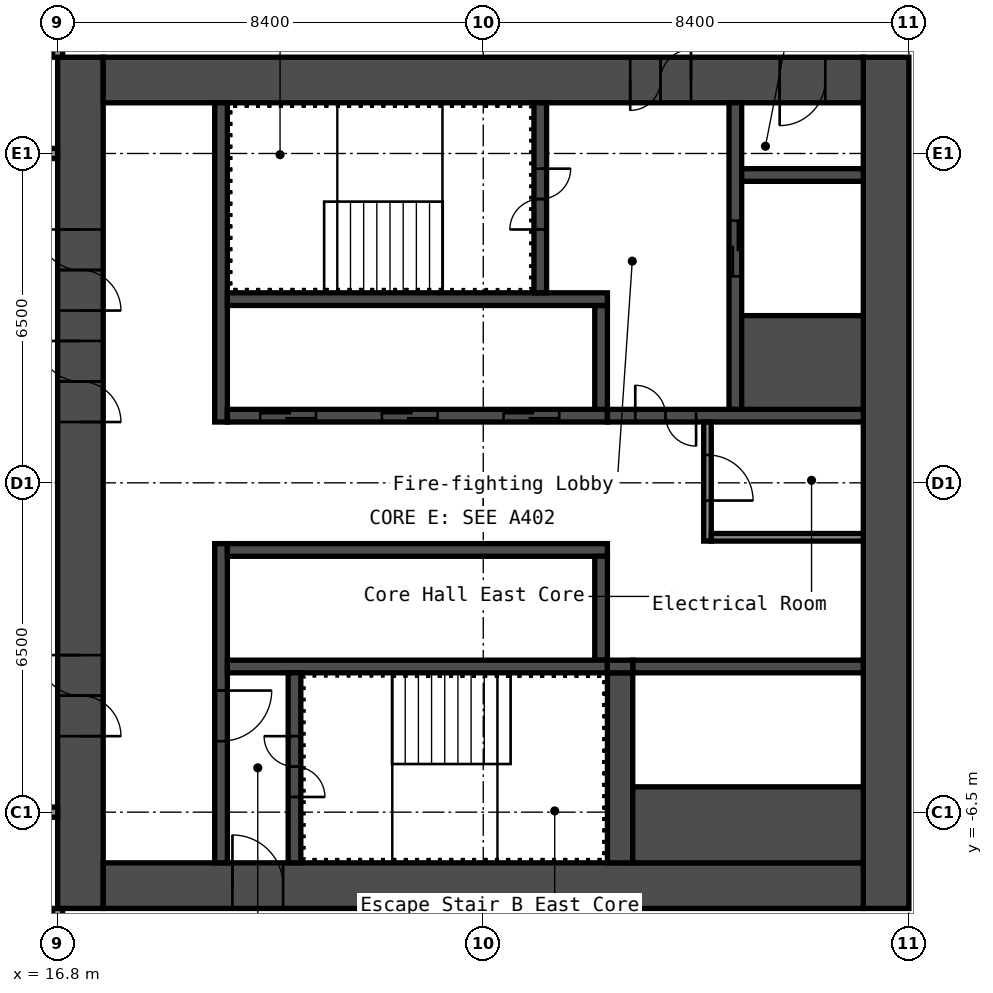
"""IFC4 building model, lengths in metres.
Left out: names, types, materials, properties, quantities, classifications, styles, units other than length and angle.
Written with IfcOpenShell. Run it as: python <this file> out.ifc"""

import sys

from ifc_helpers import new_model, si_unit, direction, frame, frame_2d, origin, place, context, subcontext, project, spatial, rectangle, extrude, element, fill, save


model = new_model("IFC4")
c1 = context("Model", 3, precision=1e-05, world=origin(), true_north=direction((0.0, 1.0)))
c2 = subcontext(c1, "Body", "Model", "MODEL_VIEW")
j1 = project(units=[si_unit("LENGTHUNIT", "METRE"), si_unit("PLANEANGLEUNIT", "RADIAN")], contexts=[c1])
p1 = place(None, origin())
s1 = spatial("IfcSite", under=j1, at=p1, CompositionType="ELEMENT")
p2 = place(p1, origin())
s2 = spatial("IfcBuilding", under=s1, at=p2, CompositionType="ELEMENT")
p3 = place(p2, frame((0.0, 0.0, 9.0)))
s3 = spatial("IfcBuildingStorey", under=s2, at=p3, CompositionType="ELEMENT", Elevation=9.0)
p4 = place(p3, frame((17.25, -8.4, 0.0), z_axis=(0.0, 0.0, 1.0), x_axis=(0.0, 1.0, 0.0)))
e1 = element("IfcWall", 1, at=p4, inside=s3, PredefinedType="SHEAR", context=c2, shape_type="SweptSolid", body=[
    extrude(rectangle(XDim=16.8, YDim=0.9, at=frame_2d((8.4, 0.0))), origin(), (0.0, 0.0, 1.0), 5.6),
])
p5 = place(p4, frame((3.4, 0.0, 0.0)))
e2 = element("IfcOpeningElement", 2, at=p5, cuts=e1, PredefinedType="OPENING", context=c2, shape_type="SweptSolid", body=[
    extrude(rectangle(XDim=1.6, YDim=2.1, at=frame_2d((0.8, 1.05))), frame((0.0, 0.46, 0.0), z_axis=(0.0, -1.0, 0.0), x_axis=(1.0, 0.0, 0.0)), (0.0, 0.0, 1.0), 0.92),
])
p6 = place(p4, frame((9.6, 0.0, 0.0)))
e3 = element("IfcOpeningElement", 3, at=p6, cuts=e1, PredefinedType="OPENING", context=c2, shape_type="SweptSolid", body=[
    extrude(rectangle(XDim=1.6, YDim=2.1, at=frame_2d((0.8, 1.05))), frame((0.0, 0.46, 0.0), z_axis=(0.0, -1.0, 0.0), x_axis=(1.0, 0.0, 0.0)), (0.0, 0.0, 1.0), 0.92),
])
p7 = place(p4, frame((11.8, 0.0, 0.0)))
e4 = element("IfcOpeningElement", 4, at=p7, cuts=e1, PredefinedType="OPENING", context=c2, shape_type="SweptSolid", body=[
    extrude(rectangle(XDim=1.6, YDim=2.1, at=frame_2d((0.8, 1.05))), frame((0.0, 0.46, 0.0), z_axis=(0.0, -1.0, 0.0), x_axis=(1.0, 0.0, 0.0)), (0.0, 0.0, 1.0), 0.92),
])
p8 = place(p3, frame((33.15, -8.4, 0.0), z_axis=(0.0, 0.0, 1.0), x_axis=(0.0, 1.0, 0.0)))
e5 = element("IfcWall", 5, at=p8, inside=s3, PredefinedType="SHEAR", context=c2, shape_type="SweptSolid", body=[
    extrude(rectangle(XDim=16.8, YDim=0.9, at=frame_2d((8.4, 0.0))), origin(), (0.0, 0.0, 1.0), 5.6),
])
p9 = place(p3, frame((17.7, 7.95, 0.0), z_axis=(0.0, 0.0, 1.0), x_axis=(1.0, 0.0, 0.0)))
e6 = element("IfcWall", 6, at=p9, inside=s3, PredefinedType="SHEAR", context=c2, shape_type="SweptSolid", body=[
    extrude(rectangle(XDim=15.0, YDim=0.9, at=frame_2d((7.5, 0.0))), origin(), (0.0, 0.0, 1.0), 5.6),
])
p10 = place(p9, frame((10.4, 0.0, 0.0)))
e7 = element("IfcOpeningElement", 7, at=p10, cuts=e6, PredefinedType="OPENING", context=c2, shape_type="SweptSolid", body=[
    extrude(rectangle(XDim=1.2, YDim=2.1, at=frame_2d((0.6, 1.05))), frame((0.0, 0.46, 0.0), z_axis=(0.0, -1.0, 0.0), x_axis=(1.0, 0.0, 0.0)), (0.0, 0.0, 1.0), 0.92),
])
p11 = place(p9, frame((13.35, 0.0, 0.0)))
e8 = element("IfcOpeningElement", 8, at=p11, cuts=e6, PredefinedType="OPENING", context=c2, shape_type="SweptSolid", body=[
    extrude(rectangle(XDim=0.9, YDim=2.1, at=frame_2d((0.45, 1.05))), frame((0.0, 0.46, 0.0), z_axis=(0.0, -1.0, 0.0), x_axis=(1.0, 0.0, 0.0)), (0.0, 0.0, 1.0), 0.92),
])
p12 = place(p3, frame((17.7, -7.95, 0.0), z_axis=(0.0, 0.0, 1.0), x_axis=(1.0, 0.0, 0.0)))
e9 = element("IfcWall", 9, at=p12, inside=s3, PredefinedType="SHEAR", context=c2, shape_type="SweptSolid", body=[
    extrude(rectangle(XDim=15.0, YDim=0.9, at=frame_2d((7.5, 0.0))), origin(), (0.0, 0.0, 1.0), 5.6),
])
p13 = place(p12, frame((2.55, 0.0, 0.0)))
e10 = element("IfcOpeningElement", 10, at=p13, cuts=e9, PredefinedType="OPENING", context=c2, shape_type="SweptSolid", body=[
    extrude(rectangle(XDim=1.0, YDim=2.1, at=frame_2d((0.5, 1.05))), frame((0.0, 0.46, 0.0), z_axis=(0.0, -1.0, 0.0), x_axis=(1.0, 0.0, 0.0)), (0.0, 0.0, 1.0), 0.92),
])
p14 = place(p3, frame((20.025, 1.2, 0.0), z_axis=(0.0, 0.0, 1.0), x_axis=(0.0, 1.0, 0.0)))
e11 = element("IfcWall", 11, at=p14, inside=s3, PredefinedType="SHEAR", context=c2, shape_type="SweptSolid", body=[
    extrude(rectangle(XDim=6.3, YDim=0.25, at=frame_2d((3.15, 0.0))), origin(), (0.0, 0.0, 1.0), 5.6),
])
p15 = place(p3, frame((20.025, -7.5, 0.0), z_axis=(0.0, 0.0, 1.0), x_axis=(0.0, 1.0, 0.0)))
e12 = element("IfcWall", 12, at=p15, inside=s3, PredefinedType="SHEAR", context=c2, shape_type="SweptSolid", body=[
    extrude(rectangle(XDim=6.3, YDim=0.25, at=frame_2d((3.15, 0.0))), origin(), (0.0, 0.0, 1.0), 5.6),
])
p16 = place(p15, frame((2.4, 0.0, 0.0)))
e13 = element("IfcOpeningElement", 13, at=p16, cuts=e12, PredefinedType="OPENING", context=c2, shape_type="SweptSolid", body=[
    extrude(rectangle(XDim=1.0, YDim=2.1, at=frame_2d((0.5, 1.05))), frame((0.0, 0.135, 0.0), z_axis=(0.0, -1.0, 0.0), x_axis=(1.0, 0.0, 0.0)), (0.0, 0.0, 1.0), 0.27),
])
p17 = place(p3, frame((20.15, 1.325, 0.0), z_axis=(0.0, 0.0, 1.0), x_axis=(1.0, 0.0, 0.0)))
e14 = element("IfcWall", 14, at=p17, inside=s3, PredefinedType="SHEAR", context=c2, shape_type="SweptSolid", body=[
    extrude(rectangle(XDim=7.5, YDim=0.25, at=frame_2d((3.75, 0.0))), origin(), (0.0, 0.0, 1.0), 5.6),
])
p18 = place(p17, frame((0.65, 0.0, 0.0)))
e15 = element("IfcOpeningElement", 15, at=p18, cuts=e14, PredefinedType="OPENING", context=c2, shape_type="SweptSolid", body=[
    extrude(rectangle(XDim=1.1, YDim=2.1, at=frame_2d((0.55, 1.05))), frame((0.0, 0.135, 0.0), z_axis=(0.0, -1.0, 0.0), x_axis=(1.0, 0.0, 0.0)), (0.0, 0.0, 1.0), 0.27),
])
p19 = place(p17, frame((3.05, 0.0, 0.0)))
e16 = element("IfcOpeningElement", 16, at=p19, cuts=e14, PredefinedType="OPENING", context=c2, shape_type="SweptSolid", body=[
    extrude(rectangle(XDim=1.1, YDim=2.1, at=frame_2d((0.55, 1.05))), frame((0.0, 0.135, 0.0), z_axis=(0.0, -1.0, 0.0), x_axis=(1.0, 0.0, 0.0)), (0.0, 0.0, 1.0), 0.27),
])
p20 = place(p17, frame((5.45, 0.0, 0.0)))
e17 = element("IfcOpeningElement", 17, at=p20, cuts=e14, PredefinedType="OPENING", context=c2, shape_type="SweptSolid", body=[
    extrude(rectangle(XDim=1.1, YDim=2.1, at=frame_2d((0.55, 1.05))), frame((0.0, 0.135, 0.0), z_axis=(0.0, -1.0, 0.0), x_axis=(1.0, 0.0, 0.0)), (0.0, 0.0, 1.0), 0.27),
])
p21 = place(p3, frame((27.525, 1.45, 0.0), z_axis=(0.0, 0.0, 1.0), x_axis=(0.0, 1.0, 0.0)))
e18 = element("IfcWall", 18, at=p21, inside=s3, PredefinedType="SHEAR", context=c2, shape_type="SweptSolid", body=[
    extrude(rectangle(XDim=2.05, YDim=0.25, at=frame_2d((1.025, 0.0))), origin(), (0.0, 0.0, 1.0), 5.6),
])
p22 = place(p3, frame((20.15, 3.625, 0.0), z_axis=(0.0, 0.0, 1.0), x_axis=(1.0, 0.0, 0.0)))
e19 = element("IfcWall", 19, at=p22, inside=s3, PredefinedType="SHEAR", context=c2, shape_type="SweptSolid", body=[
    extrude(rectangle(XDim=7.5, YDim=0.25, at=frame_2d((3.75, 0.0))), origin(), (0.0, 0.0, 1.0), 5.6),
])
p23 = place(p3, frame((26.325, 3.75, 0.0), z_axis=(0.0, 0.0, 1.0), x_axis=(0.0, 1.0, 0.0)))
e20 = element("IfcWall", 20, at=p23, inside=s3, PredefinedType="SHEAR", context=c2, shape_type="SweptSolid", body=[
    extrude(rectangle(XDim=3.75, YDim=0.25, at=frame_2d((1.875, 0.0))), origin(), (0.0, 0.0, 1.0), 5.6),
])
p24 = place(p23, frame((1.25, 0.0, 0.0)))
e21 = element("IfcOpeningElement", 21, at=p24, cuts=e20, PredefinedType="OPENING", context=c2, shape_type="SweptSolid", body=[
    extrude(rectangle(XDim=1.2, YDim=2.1, at=frame_2d((0.6, 1.05))), frame((0.0, 0.135, 0.0), z_axis=(0.0, -1.0, 0.0), x_axis=(1.0, 0.0, 0.0)), (0.0, 0.0, 1.0), 0.27),
])
p25 = place(p3, frame((27.65, 1.325, 0.0), z_axis=(0.0, 0.0, 1.0), x_axis=(1.0, 0.0, 0.0)))
e22 = element("IfcWall", 22, at=p25, inside=s3, PredefinedType="SHEAR", context=c2, shape_type="SweptSolid", body=[
    extrude(rectangle(XDim=5.05, YDim=0.25, at=frame_2d((2.525, 0.0))), origin(), (0.0, 0.0, 1.0), 5.6),
])
p26 = place(p25, frame((0.55, 0.0, 0.0)))
e23 = element("IfcOpeningElement", 23, at=p26, cuts=e22, PredefinedType="OPENING", context=c2, shape_type="SweptSolid", body=[
    extrude(rectangle(XDim=1.2, YDim=2.1, at=frame_2d((0.6, 1.05))), frame((0.0, 0.135, 0.0), z_axis=(0.0, -1.0, 0.0), x_axis=(1.0, 0.0, 0.0)), (0.0, 0.0, 1.0), 0.27),
])
p27 = place(p3, frame((30.175, 1.45, 0.0), z_axis=(0.0, 0.0, 1.0), x_axis=(0.0, 1.0, 0.0)))
e24 = element("IfcWall", 24, at=p27, inside=s3, PredefinedType="SHEAR", context=c2, shape_type="SweptSolid", body=[
    extrude(rectangle(XDim=6.05, YDim=0.25, at=frame_2d((3.025, 0.0))), origin(), (0.0, 0.0, 1.0), 5.6),
])
p28 = place(p27, frame((2.625, 0.0, 0.0)))
e25 = element("IfcOpeningElement", 25, at=p28, cuts=e24, PredefinedType="OPENING", context=c2, shape_type="SweptSolid", body=[
    extrude(rectangle(XDim=1.1, YDim=2.1, at=frame_2d((0.55, 1.05))), frame((0.0, 0.135, 0.0), z_axis=(0.0, -1.0, 0.0), x_axis=(1.0, 0.0, 0.0)), (0.0, 0.0, 1.0), 0.27),
])
p29 = place(p3, frame((30.3, 2.375, 0.0), z_axis=(0.0, 0.0, 1.0), x_axis=(1.0, 0.0, 0.0)))
e26 = element("IfcWall", 26, at=p29, inside=s3, PredefinedType="SHEAR", context=c2, shape_type="SweptSolid", body=[
    extrude(rectangle(XDim=2.4, YDim=1.85, at=frame_2d((1.2, 0.0))), origin(), (0.0, 0.0, 1.0), 5.6),
])
p30 = place(p3, frame((30.3, 6.075, 0.0), z_axis=(0.0, 0.0, 1.0), x_axis=(1.0, 0.0, 0.0)))
e27 = element("IfcWall", 27, at=p30, inside=s3, PredefinedType="SHEAR", context=c2, shape_type="SweptSolid", body=[
    extrude(rectangle(XDim=2.4, YDim=0.25, at=frame_2d((1.2, 0.0))), origin(), (0.0, 0.0, 1.0), 5.6),
])
p31 = place(p3, frame((20.15, -1.325, 0.0), z_axis=(0.0, 0.0, 1.0), x_axis=(1.0, 0.0, 0.0)))
e28 = element("IfcWall", 28, at=p31, inside=s3, PredefinedType="SHEAR", context=c2, shape_type="SweptSolid", body=[
    extrude(rectangle(XDim=7.5, YDim=0.25, at=frame_2d((3.75, 0.0))), origin(), (0.0, 0.0, 1.0), 5.6),
])
p32 = place(p3, frame((27.525, -3.5, 0.0), z_axis=(0.0, 0.0, 1.0), x_axis=(0.0, 1.0, 0.0)))
e29 = element("IfcWall", 29, at=p32, inside=s3, PredefinedType="SHEAR", context=c2, shape_type="SweptSolid", body=[
    extrude(rectangle(XDim=2.05, YDim=0.25, at=frame_2d((1.025, 0.0))), origin(), (0.0, 0.0, 1.0), 5.6),
])
p33 = place(p3, frame((20.15, -3.625, 0.0), z_axis=(0.0, 0.0, 1.0), x_axis=(1.0, 0.0, 0.0)))
e30 = element("IfcWall", 30, at=p33, inside=s3, PredefinedType="SHEAR", context=c2, shape_type="SweptSolid", body=[
    extrude(rectangle(XDim=7.5, YDim=0.25, at=frame_2d((3.75, 0.0))), origin(), (0.0, 0.0, 1.0), 5.6),
])
p34 = place(p3, frame((21.475, -7.5, 0.0), z_axis=(0.0, 0.0, 1.0), x_axis=(0.0, 1.0, 0.0)))
e31 = element("IfcWall", 31, at=p34, inside=s3, PredefinedType="SHEAR", context=c2, shape_type="SweptSolid", body=[
    extrude(rectangle(XDim=3.75, YDim=0.25, at=frame_2d((1.875, 0.0))), origin(), (0.0, 0.0, 1.0), 5.6),
])
p35 = place(p34, frame((1.3, 0.0, 0.0)))
e32 = element("IfcOpeningElement", 32, at=p35, cuts=e31, PredefinedType="OPENING", context=c2, shape_type="SweptSolid", body=[
    extrude(rectangle(XDim=1.2, YDim=2.1, at=frame_2d((0.6, 1.05))), frame((0.0, 0.135, 0.0), z_axis=(0.0, -1.0, 0.0), x_axis=(1.0, 0.0, 0.0)), (0.0, 0.0, 1.0), 0.27),
])
p36 = place(p3, frame((27.9, -7.5, 0.0), z_axis=(0.0, 0.0, 1.0), x_axis=(0.0, 1.0, 0.0)))
e33 = element("IfcWall", 33, at=p36, inside=s3, PredefinedType="SHEAR", context=c2, shape_type="SweptSolid", body=[
    extrude(rectangle(XDim=3.75, YDim=0.5, at=frame_2d((1.875, 0.0))), origin(), (0.0, 0.0, 1.0), 5.6),
])
p37 = place(p3, frame((28.15, -3.625, 0.0), z_axis=(0.0, 0.0, 1.0), x_axis=(1.0, 0.0, 0.0)))
e34 = element("IfcWall", 34, at=p37, inside=s3, PredefinedType="SHEAR", context=c2, shape_type="SweptSolid", body=[
    extrude(rectangle(XDim=4.55, YDim=0.25, at=frame_2d((2.275, 0.0))), origin(), (0.0, 0.0, 1.0), 5.6),
])
p38 = place(p3, frame((28.15, -6.75, 0.0), z_axis=(0.0, 0.0, 1.0), x_axis=(1.0, 0.0, 0.0)))
e35 = element("IfcWall", 35, at=p38, inside=s3, PredefinedType="SHEAR", context=c2, shape_type="SweptSolid", body=[
    extrude(rectangle(XDim=4.55, YDim=1.5, at=frame_2d((2.275, 0.0))), origin(), (0.0, 0.0, 1.0), 5.6),
])
p39 = place(p3, frame((27.65, -3.625, 0.0), z_axis=(0.0, 0.0, 1.0), x_axis=(1.0, 0.0, 0.0)))
e36 = element("IfcWall", 36, at=p39, inside=s3, PredefinedType="SHEAR", context=c2, shape_type="SweptSolid", body=[
    extrude(rectangle(XDim=0.5, YDim=0.25, at=frame_2d((0.25, 0.0))), origin(), (0.0, 0.0, 1.0), 5.6),
])
p40 = place(p3, frame((29.625, -1.15, 0.0), z_axis=(0.0, 0.0, 1.0), x_axis=(0.0, 1.0, 0.0)))
e37 = element("IfcWall", 37, at=p40, inside=s3, PredefinedType="PARTITIONING", context=c2, shape_type="SweptSolid", body=[
    extrude(rectangle(XDim=2.35, YDim=0.15, at=frame_2d((1.175, 0.0))), origin(), (0.0, 0.0, 1.0), 5.6),
])
p41 = place(p40, frame((0.8, 0.0, 0.0)))
e38 = element("IfcOpeningElement", 38, at=p41, cuts=e37, PredefinedType="OPENING", context=c2, shape_type="SweptSolid", body=[
    extrude(rectangle(XDim=0.9, YDim=2.1, at=frame_2d((0.45, 1.05))), frame((0.0, 0.085, 0.0), z_axis=(0.0, -1.0, 0.0), x_axis=(1.0, 0.0, 0.0)), (0.0, 0.0, 1.0), 0.17),
])
p42 = place(p3, frame((29.7, -1.075, 0.0), z_axis=(0.0, 0.0, 1.0), x_axis=(1.0, 0.0, 0.0)))
e39 = element("IfcWall", 39, at=p42, inside=s3, PredefinedType="PARTITIONING", context=c2, shape_type="SweptSolid", body=[
    extrude(rectangle(XDim=3.0, YDim=0.15, at=frame_2d((1.5, 0.0))), origin(), (0.0, 0.0, 1.0), 5.6),
])
p43 = place(p3, frame((16.8, 8.4, 0.0), z_axis=(0.0, 0.0, 1.0), x_axis=(0.0, 1.0, 0.0)))
e40 = element("IfcWall", 40, at=p43, inside=s3, PredefinedType="PARTITIONING", context=c2, shape_type="SweptSolid", body=[
    extrude(rectangle(XDim=2.0, YDim=0.2, at=frame_2d((1.0, 0.0))), origin(), (0.0, 0.0, 1.0), 5.6),
])
p44 = place(p43, frame((0.4, 0.0, 0.0)))
e41 = element("IfcOpeningElement", 41, at=p44, cuts=e40, PredefinedType="OPENING", context=c2, shape_type="SweptSolid", body=[
    extrude(rectangle(XDim=1.2, YDim=2.1, at=frame_2d((0.6, 1.05))), frame((0.0, 0.11, 0.0), z_axis=(0.0, -1.0, 0.0), x_axis=(1.0, 0.0, 0.0)), (0.0, 0.0, 1.0), 0.22),
])
p45 = place(p3, frame((16.8, -10.4, 0.0), z_axis=(0.0, 0.0, 1.0), x_axis=(0.0, 1.0, 0.0)))
e42 = element("IfcWall", 42, at=p45, inside=s3, PredefinedType="PARTITIONING", context=c2, shape_type="SweptSolid", body=[
    extrude(rectangle(XDim=2.0, YDim=0.2, at=frame_2d((1.0, 0.0))), origin(), (0.0, 0.0, 1.0), 5.6),
])
for number, where, z_axis, x_axis in (
    (43, (12.0, -6.5, 0.0), (0.0, 0.0, 1.0), (1.0, 0.0, 0.0)),
    (44, (12.0, 6.5, 0.0), (0.0, 0.0, 1.0), (1.0, 0.0, 0.0)),
):
    element("IfcWall", number, at=place(p3, frame(where, z_axis=z_axis, x_axis=x_axis)), inside=s3, PredefinedType="PARTITIONING", context=c2, shape_type="SweptSolid", body=[
        extrude(rectangle(XDim=4.8, YDim=0.2, at=frame_2d((2.4, 0.0))), origin(), (0.0, 0.0, 1.0), 5.6),
    ])
p46 = place(p5, origin())
e45 = element("IfcDoor", 45, at=p46, inside=s3, OperationType="DOUBLE_DOOR_SINGLE_SWING", PredefinedType="DOOR", context=c2, shape_type="SweptSolid", body=[
    extrude(rectangle(XDim=1.6, YDim=2.1, at=frame_2d((0.8, 1.05))), frame((0.0, 0.025, 0.0), z_axis=(0.0, -1.0, 0.0), x_axis=(1.0, 0.0, 0.0)), (0.0, 0.0, 1.0), 0.05),
])
fill(e2, e45)
p47 = place(p6, origin())
e46 = element("IfcDoor", 46, at=p47, inside=s3, OperationType="DOUBLE_DOOR_SINGLE_SWING", PredefinedType="DOOR", context=c2, shape_type="SweptSolid", body=[
    extrude(rectangle(XDim=1.6, YDim=2.1, at=frame_2d((0.8, 1.05))), frame((0.0, 0.025, 0.0), z_axis=(0.0, -1.0, 0.0), x_axis=(1.0, 0.0, 0.0)), (0.0, 0.0, 1.0), 0.05),
])
fill(e3, e46)
p48 = place(p7, origin())
e47 = element("IfcDoor", 47, at=p48, inside=s3, OperationType="DOUBLE_DOOR_SINGLE_SWING", PredefinedType="DOOR", context=c2, shape_type="SweptSolid", body=[
    extrude(rectangle(XDim=1.6, YDim=2.1, at=frame_2d((0.8, 1.05))), frame((0.0, 0.025, 0.0), z_axis=(0.0, -1.0, 0.0), x_axis=(1.0, 0.0, 0.0)), (0.0, 0.0, 1.0), 0.05),
])
fill(e4, e47)
p49 = place(p10, origin())
e48 = element("IfcDoor", 48, at=p49, inside=s3, OperationType="DOUBLE_DOOR_SINGLE_SWING", PredefinedType="DOOR", context=c2, shape_type="SweptSolid", body=[
    extrude(rectangle(XDim=1.2, YDim=2.1, at=frame_2d((0.6, 1.05))), frame((0.0, 0.025, 0.0), z_axis=(0.0, -1.0, 0.0), x_axis=(1.0, 0.0, 0.0)), (0.0, 0.0, 1.0), 0.05),
])
fill(e7, e48)
p50 = place(p11, origin())
e49 = element("IfcDoor", 49, at=p50, inside=s3, OperationType="SINGLE_SWING_LEFT", PredefinedType="DOOR", context=c2, shape_type="SweptSolid", body=[
    extrude(rectangle(XDim=0.9, YDim=2.1, at=frame_2d((0.45, 1.05))), frame((0.0, 0.025, 0.0), z_axis=(0.0, -1.0, 0.0), x_axis=(1.0, 0.0, 0.0)), (0.0, 0.0, 1.0), 0.05),
])
fill(e8, e49)
p51 = place(p13, origin())
e50 = element("IfcDoor", 50, at=p51, inside=s3, OperationType="SINGLE_SWING_RIGHT", PredefinedType="DOOR", context=c2, shape_type="SweptSolid", body=[
    extrude(rectangle(XDim=1.0, YDim=2.1, at=frame_2d((0.5, 1.05))), frame((0.0, 0.025, 0.0), z_axis=(0.0, -1.0, 0.0), x_axis=(1.0, 0.0, 0.0)), (0.0, 0.0, 1.0), 0.05),
])
fill(e10, e50)
p52 = place(p24, origin())
e51 = element("IfcDoor", 51, at=p52, inside=s3, OperationType="DOUBLE_DOOR_SINGLE_SWING", PredefinedType="DOOR", context=c2, shape_type="SweptSolid", body=[
    extrude(rectangle(XDim=1.2, YDim=2.1, at=frame_2d((0.6, 1.05))), frame((0.0, 0.025, 0.0), z_axis=(0.0, -1.0, 0.0), x_axis=(1.0, 0.0, 0.0)), (0.0, 0.0, 1.0), 0.05),
])
fill(e21, e51)
p53 = place(p35, origin())
e52 = element("IfcDoor", 52, at=p53, inside=s3, OperationType="DOUBLE_DOOR_SINGLE_SWING", PredefinedType="DOOR", context=c2, shape_type="SweptSolid", body=[
    extrude(rectangle(XDim=1.2, YDim=2.1, at=frame_2d((0.6, 1.05))), frame((0.0, 0.025, 0.0), z_axis=(0.0, -1.0, 0.0), x_axis=(1.0, 0.0, 0.0)), (0.0, 0.0, 1.0), 0.05),
])
fill(e32, e52)
p54 = place(p16, origin())
e53 = element("IfcDoor", 53, at=p54, inside=s3, OperationType="SINGLE_SWING_RIGHT", PredefinedType="DOOR", context=c2, shape_type="SweptSolid", body=[
    extrude(rectangle(XDim=1.0, YDim=2.1, at=frame_2d((0.5, 1.05))), frame((0.0, 0.025, 0.0), z_axis=(0.0, -1.0, 0.0), x_axis=(1.0, 0.0, 0.0)), (0.0, 0.0, 1.0), 0.05),
])
fill(e13, e53)
p55 = place(p26, origin())
e54 = element("IfcDoor", 54, at=p55, inside=s3, OperationType="DOUBLE_DOOR_SINGLE_SWING", PredefinedType="DOOR", context=c2, shape_type="SweptSolid", body=[
    extrude(rectangle(XDim=1.2, YDim=2.1, at=frame_2d((0.6, 1.05))), frame((0.0, 0.025, 0.0), z_axis=(0.0, -1.0, 0.0), x_axis=(1.0, 0.0, 0.0)), (0.0, 0.0, 1.0), 0.05),
])
fill(e23, e54)
p56 = place(p41, origin())
e55 = element("IfcDoor", 55, at=p56, inside=s3, OperationType="SINGLE_SWING_LEFT", PredefinedType="DOOR", context=c2, shape_type="SweptSolid", body=[
    extrude(rectangle(XDim=0.9, YDim=2.1, at=frame_2d((0.45, 1.05))), frame((0.0, 0.025, 0.0), z_axis=(0.0, -1.0, 0.0), x_axis=(1.0, 0.0, 0.0)), (0.0, 0.0, 1.0), 0.05),
])
fill(e38, e55)
p57 = place(p18, origin())
e56 = element("IfcDoor", 56, at=p57, inside=s3, OperationType="DOUBLE_DOOR_SLIDING", PredefinedType="DOOR", context=c2, shape_type="SweptSolid", body=[
    extrude(rectangle(XDim=1.1, YDim=2.1, at=frame_2d((0.55, 1.05))), frame((0.0, 0.025, 0.0), z_axis=(0.0, -1.0, 0.0), x_axis=(1.0, 0.0, 0.0)), (0.0, 0.0, 1.0), 0.05),
])
fill(e15, e56)
p58 = place(p19, origin())
e57 = element("IfcDoor", 57, at=p58, inside=s3, OperationType="DOUBLE_DOOR_SLIDING", PredefinedType="DOOR", context=c2, shape_type="SweptSolid", body=[
    extrude(rectangle(XDim=1.1, YDim=2.1, at=frame_2d((0.55, 1.05))), frame((0.0, 0.025, 0.0), z_axis=(0.0, -1.0, 0.0), x_axis=(1.0, 0.0, 0.0)), (0.0, 0.0, 1.0), 0.05),
])
fill(e16, e57)
p59 = place(p20, origin())
e58 = element("IfcDoor", 58, at=p59, inside=s3, OperationType="DOUBLE_DOOR_SLIDING", PredefinedType="DOOR", context=c2, shape_type="SweptSolid", body=[
    extrude(rectangle(XDim=1.1, YDim=2.1, at=frame_2d((0.55, 1.05))), frame((0.0, 0.025, 0.0), z_axis=(0.0, -1.0, 0.0), x_axis=(1.0, 0.0, 0.0)), (0.0, 0.0, 1.0), 0.05),
])
fill(e17, e58)
p60 = place(p28, origin())
e59 = element("IfcDoor", 59, at=p60, inside=s3, OperationType="DOUBLE_DOOR_SLIDING", PredefinedType="DOOR", context=c2, shape_type="SweptSolid", body=[
    extrude(rectangle(XDim=1.1, YDim=2.1, at=frame_2d((0.55, 1.05))), frame((0.0, 0.025, 0.0), z_axis=(0.0, -1.0, 0.0), x_axis=(1.0, 0.0, 0.0)), (0.0, 0.0, 1.0), 0.05),
])
fill(e25, e59)
save(model, sys.argv[1])
